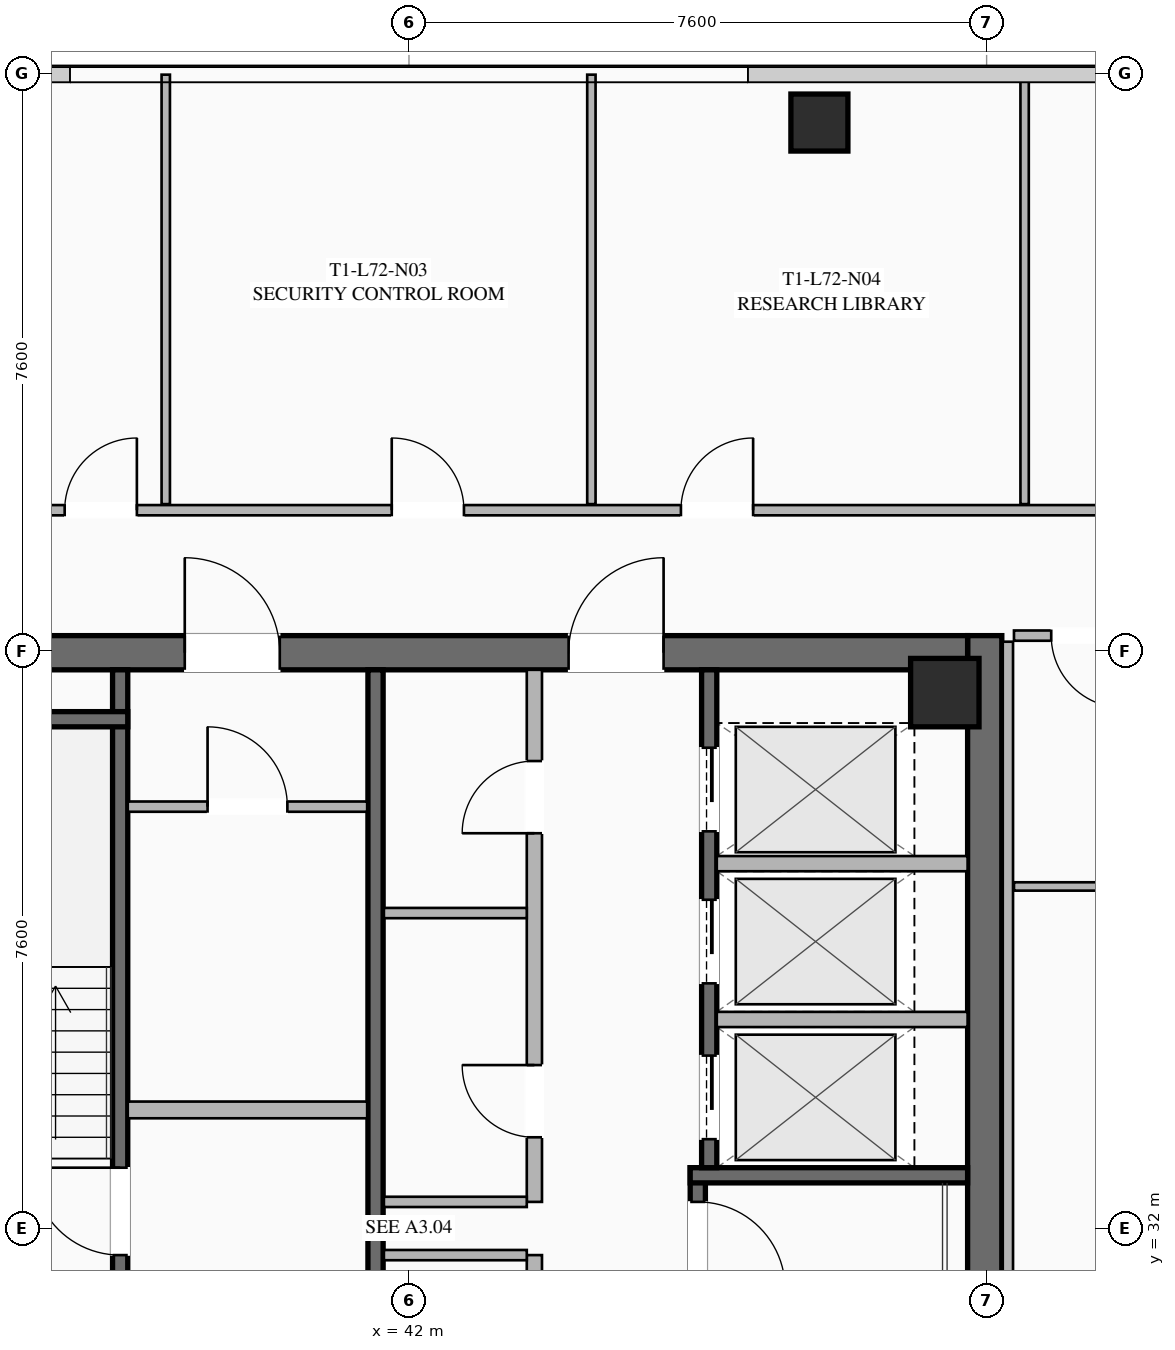
"""IFC4 building model, lengths in metres.
Left out: names, types, materials, properties, quantities, classifications, styles, units other than length and angle.
Written with IfcOpenShell. Run it as: python <this file> out.ifc"""

import sys

from ifc_helpers import new_model, si_unit, direction, frame, frame_2d, origin, origin_2d, place, context, subcontext, project, spatial, rectangle, hollow_rectangle, extrude, element, fill, save


model = new_model("IFC4")
c1 = context("Model", 3, precision=1e-05, world=origin(), true_north=direction((0.0, 1.0)))
c2 = subcontext(c1, "Body", "Model", "MODEL_VIEW")
j1 = project(units=[si_unit("LENGTHUNIT", "METRE"), si_unit("PLANEANGLEUNIT", "RADIAN")], contexts=[c1])
p1 = place(None, origin())
s1 = spatial("IfcSite", under=j1, at=p1, CompositionType="ELEMENT")
p2 = place(p1, origin())
s2 = spatial("IfcBuilding", under=s1, at=p2, CompositionType="ELEMENT")
p3 = place(p2, frame((0.0, 0.0, 266.95)))
s3 = spatial("IfcBuildingStorey", under=s2, at=p3, CompositionType="ELEMENT", Elevation=266.95)
p4 = place(p3, frame((49.575, 39.8, 0.0), z_axis=(0.0, 0.0, 1.0), x_axis=(0.0, -1.0, 0.0)))
e1 = element("IfcWall", 1, at=p4, inside=s3, PredefinedType="SHEAR", context=c2, shape_type="SweptSolid", body=[
    extrude(rectangle(XDim=15.6, YDim=0.45, at=frame_2d((7.8, 0.0))), origin(), (0.0, 0.0, 1.0), 3.55),
])
p5 = place(p3, frame((34.65, 39.575, 0.0), z_axis=(0.0, 0.0, 1.0), x_axis=(1.0, 0.0, 0.0)))
e2 = element("IfcWall", 2, at=p5, inside=s3, PredefinedType="SHEAR", context=c2, shape_type="SweptSolid", body=[
    extrude(rectangle(XDim=14.7, YDim=0.45, at=frame_2d((7.35, 0.0))), origin(), (0.0, 0.0, 1.0), 3.55),
])
p6 = place(p5, frame((4.4, 0.0, 0.0)))
e3 = element("IfcOpeningElement", 3, at=p6, cuts=e2, PredefinedType="OPENING", context=c2, shape_type="SweptSolid", body=[
    extrude(rectangle(XDim=1.25, YDim=2.25, at=frame_2d((0.625, 1.125))), frame((0.0, 0.235, 0.0), z_axis=(0.0, -1.0, 0.0), x_axis=(1.0, 0.0, 0.0)), (0.0, 0.0, 1.0), 0.47),
])
p7 = place(p5, frame((9.45, 0.0, 0.0)))
e4 = element("IfcOpeningElement", 4, at=p7, cuts=e2, PredefinedType="OPENING", context=c2, shape_type="SweptSolid", body=[
    extrude(rectangle(XDim=1.25, YDim=2.25, at=frame_2d((0.625, 1.125))), frame((0.0, 0.235, 0.0), z_axis=(0.0, -1.0, 0.0), x_axis=(1.0, 0.0, 0.0)), (0.0, 0.0, 1.0), 0.47),
])
p8 = place(p3, frame((49.05, 39.05, 0.0), z_axis=(0.0, 0.0, 1.0), x_axis=(1.0, 0.0, 0.0)))
e5 = element("IfcColumn", 5, at=p8, inside=s3, PredefinedType="COLUMN", context=c2, shape_type="SweptSolid", body=[
    extrude(hollow_rectangle(XDim=0.9, YDim=0.9, WallThickness=0.04, at=origin_2d()), origin(), (0.0, 0.0, 1.0), 3.37),
])
p9 = place(p3, frame((47.4, 46.55, 0.0), z_axis=(0.0, 0.0, 1.0), x_axis=(1.0, 0.0, 0.0)))
e6 = element("IfcColumn", 6, at=p9, inside=s3, PredefinedType="COLUMN", context=c2, shape_type="SweptSolid", body=[
    extrude(hollow_rectangle(XDim=0.75, YDim=0.75, WallThickness=0.032, at=origin_2d()), origin(), (0.0, 0.0, 1.0), 3.37),
])
p10 = place(p3, frame((38.2, 31.2, 0.0), z_axis=(0.0, 0.0, 1.0), x_axis=(0.0, 1.0, 0.0)))
e7 = element("IfcWall", 7, at=p10, inside=s3, PredefinedType="SHEAR", context=c2, shape_type="SweptSolid", body=[
    extrude(rectangle(XDim=8.15, YDim=0.2, at=frame_2d((4.075, 0.0))), origin(), (0.0, 0.0, 1.0), 3.37),
])
p11 = place(p10, frame((0.45, 0.0, 0.0)))
e8 = element("IfcOpeningElement", 8, at=p11, cuts=e7, PredefinedType="OPENING", context=c2, shape_type="SweptSolid", body=[
    extrude(rectangle(XDim=1.15, YDim=2.2, at=frame_2d((0.575, 1.1))), frame((0.0, 0.11, 0.0), z_axis=(0.0, -1.0, 0.0), x_axis=(1.0, 0.0, 0.0)), (0.0, 0.0, 1.0), 0.22),
])
p12 = place(p3, frame((34.65, 38.7, 0.0), z_axis=(0.0, 0.0, 1.0), x_axis=(1.0, 0.0, 0.0)))
e9 = element("IfcWall", 9, at=p12, inside=s3, PredefinedType="SHEAR", context=c2, shape_type="SweptSolid", body=[
    extrude(rectangle(XDim=3.65, YDim=0.2, at=frame_2d((1.825, 0.0))), origin(), (0.0, 0.0, 1.0), 3.37),
])
p13 = place(p3, frame((45.8, 32.8, 0.0), z_axis=(0.0, 0.0, 1.0), x_axis=(0.0, -1.0, 0.0)))
e10 = element("IfcWall", 10, at=p13, inside=s3, PredefinedType="SHEAR", context=c2, shape_type="SweptSolid", body=[
    extrude(rectangle(XDim=8.15, YDim=0.2, at=frame_2d((4.075, 0.0))), origin(), (0.0, 0.0, 1.0), 3.37),
])
p14 = place(p13, frame((0.45, 0.0, 0.0)))
e11 = element("IfcOpeningElement", 11, at=p14, cuts=e10, PredefinedType="OPENING", context=c2, shape_type="SweptSolid", body=[
    extrude(rectangle(XDim=1.15, YDim=2.2, at=frame_2d((0.575, 1.1))), frame((0.0, 0.11, 0.0), z_axis=(0.0, -1.0, 0.0), x_axis=(1.0, 0.0, 0.0)), (0.0, 0.0, 1.0), 0.22),
])
p15 = place(p3, frame((45.7, 32.7, 0.0), z_axis=(0.0, 0.0, 1.0), x_axis=(1.0, 0.0, 0.0)))
e12 = element("IfcWall", 12, at=p15, inside=s3, PredefinedType="SHEAR", context=c2, shape_type="SweptSolid", body=[
    extrude(rectangle(XDim=3.65, YDim=0.2, at=frame_2d((1.825, 0.0))), origin(), (0.0, 0.0, 1.0), 3.37),
])
p16 = place(p3, frame((41.56, 24.65, 0.0), z_axis=(0.0, 0.0, 1.0), x_axis=(0.0, 1.0, 0.0)))
e13 = element("IfcWall", 13, at=p16, inside=s3, PredefinedType="SHEAR", context=c2, shape_type="SweptSolid", body=[
    extrude(rectangle(XDim=14.7, YDim=0.2, at=frame_2d((7.35, 0.0))), origin(), (0.0, 0.0, 1.0), 3.37),
])
p17 = place(p3, frame((38.3, 33.56, 0.0), z_axis=(0.0, 0.0, 1.0), x_axis=(1.0, 0.0, 0.0)))
e14 = element("IfcWall", 14, at=p17, inside=s3, PredefinedType="SOLIDWALL", context=c2, shape_type="SweptSolid", body=[
    extrude(rectangle(XDim=3.15, YDim=0.22, at=frame_2d((1.575, 0.0))), origin(), (0.0, 0.0, 1.0), 2.723),
])
p18 = place(p3, frame((45.95, 39.35, 0.0), z_axis=(0.0, 0.0, 1.0), x_axis=(0.0, -1.0, 0.0)))
e15 = element("IfcWall", 15, at=p18, inside=s3, PredefinedType="SHEAR", context=c2, shape_type="SweptSolid", body=[
    extrude(rectangle(XDim=6.55, YDim=0.2, at=frame_2d((3.275, 0.0))), origin(), (0.0, 0.0, 1.0), 3.37),
])
p19 = place(p18, frame((5.075, 0.0, 0.0)))
e16 = element("IfcOpeningElement", 16, at=p19, cuts=e15, PredefinedType="OPENING", context=c2, shape_type="SweptSolid", body=[
    extrude(rectangle(XDim=1.1, YDim=2.2, at=frame_2d((0.55, 1.1))), frame((0.0, 0.11, 0.0), z_axis=(0.0, -1.0, 0.0), x_axis=(1.0, 0.0, 0.0)), (0.0, 0.0, 1.0), 0.22),
])
p20 = place(p18, frame((3.025, 0.0, 0.0)))
e17 = element("IfcOpeningElement", 17, at=p20, cuts=e15, PredefinedType="OPENING", context=c2, shape_type="SweptSolid", body=[
    extrude(rectangle(XDim=1.1, YDim=2.2, at=frame_2d((0.55, 1.1))), frame((0.0, 0.11, 0.0), z_axis=(0.0, -1.0, 0.0), x_axis=(1.0, 0.0, 0.0)), (0.0, 0.0, 1.0), 0.22),
])
p21 = place(p18, frame((1.025, 0.0, 0.0)))
e18 = element("IfcOpeningElement", 18, at=p21, cuts=e15, PredefinedType="OPENING", context=c2, shape_type="SweptSolid", body=[
    extrude(rectangle(XDim=1.1, YDim=2.2, at=frame_2d((0.55, 1.1))), frame((0.0, 0.11, 0.0), z_axis=(0.0, -1.0, 0.0), x_axis=(1.0, 0.0, 0.0)), (0.0, 0.0, 1.0), 0.22),
])
for number, where, z_axis, x_axis in (
    (19, (46.05, 34.75, 0.0), (0.0, 0.0, 1.0), (1.0, 0.0, 0.0)),
    (20, (46.05, 36.8, 0.0), (0.0, 0.0, 1.0), (1.0, 0.0, 0.0)),
):
    element("IfcWall", number, at=place(p3, frame(where, z_axis=z_axis, x_axis=x_axis)), inside=s3, PredefinedType="SOLIDWALL", context=c2, shape_type="SweptSolid", body=[
        extrude(rectangle(XDim=3.3, YDim=0.2, at=frame_2d((1.65, 0.0))), origin(), (0.0, 0.0, 1.0), 3.37),
    ])
p22 = place(p3, frame((38.3, 37.55, 0.0), z_axis=(0.0, 0.0, 1.0), x_axis=(1.0, 0.0, 0.0)))
e21 = element("IfcWall", 21, at=p22, inside=s3, PredefinedType="PARTITIONING", context=c2, shape_type="SweptSolid", body=[
    extrude(rectangle(XDim=3.15, YDim=0.135, at=frame_2d((1.575, 0.0))), origin(), (0.0, 0.0, 1.0), 2.723),
])
p23 = place(p22, frame((1.05, 0.0, 0.0)))
e22 = element("IfcOpeningElement", 22, at=p23, cuts=e21, PredefinedType="OPENING", context=c2, shape_type="SweptSolid", body=[
    extrude(rectangle(XDim=1.05, YDim=2.2, at=frame_2d((0.525, 1.1))), frame((0.0, 0.077, 0.0), z_axis=(0.0, -1.0, 0.0), x_axis=(1.0, 0.0, 0.0)), (0.0, 0.0, 1.0), 0.155),
])
p24 = place(p3, frame((43.65, 24.65, 0.0), z_axis=(0.0, 0.0, 1.0), x_axis=(0.0, 1.0, 0.0)))
e23 = element("IfcWall", 23, at=p24, inside=s3, PredefinedType="SOLIDWALL", context=c2, shape_type="SweptSolid", body=[
    extrude(rectangle(XDim=7.0, YDim=0.2, at=frame_2d((3.5, 0.0))), origin(), (0.0, 0.0, 1.0), 2.723),
])
p25 = place(p24, frame((0.85, 0.0, 0.0)))
e24 = element("IfcOpeningElement", 24, at=p25, cuts=e23, PredefinedType="OPENING", context=c2, shape_type="SweptSolid", body=[
    extrude(rectangle(XDim=0.95, YDim=2.05, at=frame_2d((0.475, 1.025))), frame((0.0, 0.11, 0.0), z_axis=(0.0, -1.0, 0.0), x_axis=(1.0, 0.0, 0.0)), (0.0, 0.0, 1.0), 0.22),
])
p26 = place(p24, frame((4.8, 0.0, 0.0)))
e25 = element("IfcOpeningElement", 25, at=p26, cuts=e23, PredefinedType="OPENING", context=c2, shape_type="SweptSolid", body=[
    extrude(rectangle(XDim=1.05, YDim=2.2, at=frame_2d((0.525, 1.1))), frame((0.0, 0.11, 0.0), z_axis=(0.0, -1.0, 0.0), x_axis=(1.0, 0.0, 0.0)), (0.0, 0.0, 1.0), 0.22),
])
p27 = place(p3, frame((41.67, 31.65, 0.0), z_axis=(0.0, 0.0, 1.0), x_axis=(1.0, 0.0, 0.0)))
e26 = element("IfcWall", 26, at=p27, inside=s3, PredefinedType="PARTITIONING", context=c2, shape_type="SweptSolid", body=[
    extrude(rectangle(XDim=1.88, YDim=0.135, at=frame_2d((0.94, 0.0))), origin(), (0.0, 0.0, 1.0), 2.723),
])
p28 = place(p3, frame((43.65, 32.35, 0.0), z_axis=(0.0, 0.0, 1.0), x_axis=(0.0, 1.0, 0.0)))
e27 = element("IfcWall", 27, at=p28, inside=s3, PredefinedType="SOLIDWALL", context=c2, shape_type="SweptSolid", body=[
    extrude(rectangle(XDim=7.0, YDim=0.2, at=frame_2d((3.5, 0.0))), origin(), (0.0, 0.0, 1.0), 2.723),
])
p29 = place(p28, frame((0.85, 0.0, 0.0)))
e28 = element("IfcOpeningElement", 28, at=p29, cuts=e27, PredefinedType="OPENING", context=c2, shape_type="SweptSolid", body=[
    extrude(rectangle(XDim=0.95, YDim=2.05, at=frame_2d((0.475, 1.025))), frame((0.0, 0.11, 0.0), z_axis=(0.0, -1.0, 0.0), x_axis=(1.0, 0.0, 0.0)), (0.0, 0.0, 1.0), 0.22),
])
p30 = place(p28, frame((4.85, 0.0, 0.0)))
e29 = element("IfcOpeningElement", 29, at=p30, cuts=e27, PredefinedType="OPENING", context=c2, shape_type="SweptSolid", body=[
    extrude(rectangle(XDim=0.95, YDim=2.05, at=frame_2d((0.475, 1.025))), frame((0.0, 0.11, 0.0), z_axis=(0.0, -1.0, 0.0), x_axis=(1.0, 0.0, 0.0)), (0.0, 0.0, 1.0), 0.22),
])
for number, where, z_axis, x_axis in (
    (30, (41.67, 32.35, 0.0), (0.0, 0.0, 1.0), (1.0, 0.0, 0.0)),
    (31, (41.67, 36.15, 0.0), (0.0, 0.0, 1.0), (1.0, 0.0, 0.0)),
):
    element("IfcWall", number, at=place(p3, frame(where, z_axis=z_axis, x_axis=x_axis)), inside=s3, PredefinedType="PARTITIONING", context=c2, shape_type="SweptSolid", body=[
        extrude(rectangle(XDim=1.88, YDim=0.135, at=frame_2d((0.94, 0.0))), origin(), (0.0, 0.0, 1.0), 2.723),
    ])
p31 = place(p3, frame((28.85, 41.45, 0.0), z_axis=(0.0, 0.0, 1.0), x_axis=(1.0, 0.0, 0.0)))
e32 = element("IfcWall", 32, at=p31, inside=s3, PredefinedType="PARTITIONING", context=c2, shape_type="SweptSolid", body=[
    extrude(rectangle(XDim=26.3, YDim=0.135, at=frame_2d((13.15, 0.0))), origin(), (0.0, 0.0, 1.0), 2.723),
])
p32 = place(p31, frame((0.3, 0.0, 0.0)))
e33 = element("IfcOpeningElement", 33, at=p32, cuts=e32, PredefinedType="OPENING", context=c2, shape_type="SweptSolid", body=[
    extrude(rectangle(XDim=0.95, YDim=2.05, at=frame_2d((0.475, 1.025))), frame((0.0, 0.077, 0.0), z_axis=(0.0, -1.0, 0.0), x_axis=(1.0, 0.0, 0.0)), (0.0, 0.0, 1.0), 0.155),
])
p33 = place(p31, frame((8.62, 0.0, 0.0)))
e34 = element("IfcOpeningElement", 34, at=p33, cuts=e32, PredefinedType="OPENING", context=c2, shape_type="SweptSolid", body=[
    extrude(rectangle(XDim=0.95, YDim=2.05, at=frame_2d((0.475, 1.025))), frame((0.0, 0.077, 0.0), z_axis=(0.0, -1.0, 0.0), x_axis=(1.0, 0.0, 0.0)), (0.0, 0.0, 1.0), 0.155),
])
p34 = place(p31, frame((12.923, 0.0, 0.0)))
e35 = element("IfcOpeningElement", 35, at=p34, cuts=e32, PredefinedType="OPENING", context=c2, shape_type="SweptSolid", body=[
    extrude(rectangle(XDim=0.95, YDim=2.05, at=frame_2d((0.475, 1.025))), frame((0.0, 0.077, 0.0), z_axis=(0.0, -1.0, 0.0), x_axis=(1.0, 0.0, 0.0)), (0.0, 0.0, 1.0), 0.155),
])
p35 = place(p31, frame((16.728, 0.0, 0.0)))
e36 = element("IfcOpeningElement", 36, at=p35, cuts=e32, PredefinedType="OPENING", context=c2, shape_type="SweptSolid", body=[
    extrude(rectangle(XDim=0.95, YDim=2.05, at=frame_2d((0.475, 1.025))), frame((0.0, 0.077, 0.0), z_axis=(0.0, -1.0, 0.0), x_axis=(1.0, 0.0, 0.0)), (0.0, 0.0, 1.0), 0.155),
])
p36 = place(p31, frame((25.05, 0.0, 0.0)))
e37 = element("IfcOpeningElement", 37, at=p36, cuts=e32, PredefinedType="OPENING", context=c2, shape_type="SweptSolid", body=[
    extrude(rectangle(XDim=0.95, YDim=2.05, at=frame_2d((0.475, 1.025))), frame((0.0, 0.077, 0.0), z_axis=(0.0, -1.0, 0.0), x_axis=(1.0, 0.0, 0.0)), (0.0, 0.0, 1.0), 0.155),
])
for number, where, z_axis, x_axis in (
    (38, (38.8, 41.53, 0.0), (0.0, 0.0, 1.0), (0.0, 1.0, 0.0)),
    (39, (44.4, 41.53, 0.0), (0.0, 0.0, 1.0), (0.0, 1.0, 0.0)),
    (40, (50.1, 41.53, 0.0), (0.0, 0.0, 1.0), (0.0, 1.0, 0.0)),
):
    element("IfcWall", number, at=place(p3, frame(where, z_axis=z_axis, x_axis=x_axis)), inside=s3, PredefinedType="PARTITIONING", context=c2, shape_type="SweptSolid", body=[
        extrude(rectangle(XDim=5.65, YDim=0.11, at=frame_2d((2.825, 0.0))), origin(), (0.0, 0.0, 1.0), 2.723),
    ])
p37 = place(p3, frame((49.88, 39.72, 0.0), z_axis=(0.0, 0.0, 1.0), x_axis=(0.0, -1.0, 0.0)))
e41 = element("IfcWall", 41, at=p37, inside=s3, PredefinedType="PARTITIONING", context=c2, shape_type="SweptSolid", body=[
    extrude(rectangle(XDim=15.44, YDim=0.135, at=frame_2d((7.72, 0.0))), origin(), (0.0, 0.0, 1.0), 2.723),
])
p38 = place(p3, frame((57.18, 39.8, 0.0), z_axis=(0.0, 0.0, 1.0), x_axis=(-1.0, 0.0, 0.0)))
e42 = element("IfcWall", 42, at=p38, inside=s3, PredefinedType="PARTITIONING", context=c2, shape_type="SweptSolid", body=[
    extrude(rectangle(XDim=7.22, YDim=0.135, at=frame_2d((3.61, 0.0))), origin(), (0.0, 0.0, 1.0), 2.723),
])
p39 = place(p38, frame((5.78, 0.0, 0.0)))
e43 = element("IfcOpeningElement", 43, at=p39, cuts=e42, PredefinedType="OPENING", context=c2, shape_type="SweptSolid", body=[
    extrude(rectangle(XDim=0.95, YDim=2.05, at=frame_2d((0.475, 1.025))), frame((0.0, 0.077, 0.0), z_axis=(0.0, -1.0, 0.0), x_axis=(1.0, 0.0, 0.0)), (0.0, 0.0, 1.0), 0.155),
])
p40 = place(p3, frame((49.96, 36.5, 0.0), z_axis=(0.0, 0.0, 1.0), x_axis=(1.0, 0.0, 0.0)))
e44 = element("IfcWall", 44, at=p40, inside=s3, PredefinedType="PARTITIONING", context=c2, shape_type="SweptSolid", body=[
    extrude(rectangle(XDim=7.22, YDim=0.11, at=frame_2d((3.61, 0.0))), origin(), (0.0, 0.0, 1.0), 2.723),
])
p41 = place(p40, frame((1.8, 0.0, 0.0)))
e45 = element("IfcOpeningElement", 45, at=p41, cuts=e44, PredefinedType="OPENING", context=c2, shape_type="SweptSolid", body=[
    extrude(rectangle(XDim=0.95, YDim=2.05, at=frame_2d((0.475, 1.025))), frame((0.0, 0.065, 0.0), z_axis=(0.0, -1.0, 0.0), x_axis=(1.0, 0.0, 0.0)), (0.0, 0.0, 1.0), 0.13),
])
p42 = place(p6, origin())
e46 = element("IfcDoor", 46, at=p42, inside=s3, OperationType="SINGLE_SWING_LEFT", PredefinedType="DOOR", context=c2, shape_type="SweptSolid", body=[
    extrude(rectangle(XDim=1.25, YDim=2.25, at=frame_2d((0.625, 1.125))), frame((0.0, 0.025, 0.0), z_axis=(0.0, -1.0, 0.0), x_axis=(1.0, 0.0, 0.0)), (0.0, 0.0, 1.0), 0.05),
])
fill(e3, e46)
p43 = place(p7, origin())
e47 = element("IfcDoor", 47, at=p43, inside=s3, OperationType="SINGLE_SWING_RIGHT", PredefinedType="DOOR", context=c2, shape_type="SweptSolid", body=[
    extrude(rectangle(XDim=1.25, YDim=2.25, at=frame_2d((0.625, 1.125))), frame((0.0, 0.025, 0.0), z_axis=(0.0, -1.0, 0.0), x_axis=(1.0, 0.0, 0.0)), (0.0, 0.0, 1.0), 0.05),
])
fill(e4, e47)
p44 = place(p11, origin())
e48 = element("IfcDoor", 48, at=p44, inside=s3, OperationType="SINGLE_SWING_RIGHT", PredefinedType="DOOR", context=c2, shape_type="SweptSolid", body=[
    extrude(rectangle(XDim=1.15, YDim=2.2, at=frame_2d((0.575, 1.1))), frame((0.0, 0.025, 0.0), z_axis=(0.0, -1.0, 0.0), x_axis=(1.0, 0.0, 0.0)), (0.0, 0.0, 1.0), 0.05),
])
fill(e8, e48)
p45 = place(p14, origin())
e49 = element("IfcDoor", 49, at=p45, inside=s3, OperationType="SINGLE_SWING_RIGHT", PredefinedType="DOOR", context=c2, shape_type="SweptSolid", body=[
    extrude(rectangle(XDim=1.15, YDim=2.2, at=frame_2d((0.575, 1.1))), frame((0.0, 0.025, 0.0), z_axis=(0.0, -1.0, 0.0), x_axis=(1.0, 0.0, 0.0)), (0.0, 0.0, 1.0), 0.05),
])
fill(e11, e49)
p46 = place(p23, origin())
e50 = element("IfcDoor", 50, at=p46, inside=s3, OperationType="SINGLE_SWING_LEFT", PredefinedType="DOOR", context=c2, shape_type="SweptSolid", body=[
    extrude(rectangle(XDim=1.05, YDim=2.2, at=frame_2d((0.525, 1.1))), frame((0.0, 0.025, 0.0), z_axis=(0.0, -1.0, 0.0), x_axis=(1.0, 0.0, 0.0)), (0.0, 0.0, 1.0), 0.05),
])
fill(e22, e50)
p47 = place(p29, origin())
e51 = element("IfcDoor", 51, at=p47, inside=s3, OperationType="SINGLE_SWING_RIGHT", PredefinedType="DOOR", context=c2, shape_type="SweptSolid", body=[
    extrude(rectangle(XDim=0.95, YDim=2.05, at=frame_2d((0.475, 1.025))), frame((0.0, 0.025, 0.0), z_axis=(0.0, -1.0, 0.0), x_axis=(1.0, 0.0, 0.0)), (0.0, 0.0, 1.0), 0.05),
])
fill(e28, e51)
p48 = place(p30, origin())
e52 = element("IfcDoor", 52, at=p48, inside=s3, OperationType="SINGLE_SWING_LEFT", PredefinedType="DOOR", context=c2, shape_type="SweptSolid", body=[
    extrude(rectangle(XDim=0.95, YDim=2.05, at=frame_2d((0.475, 1.025))), frame((0.0, 0.025, 0.0), z_axis=(0.0, -1.0, 0.0), x_axis=(1.0, 0.0, 0.0)), (0.0, 0.0, 1.0), 0.05),
])
fill(e29, e52)
p49 = place(p33, origin())
e53 = element("IfcDoor", 53, at=p49, inside=s3, OperationType="SINGLE_SWING_RIGHT", PredefinedType="DOOR", context=c2, shape_type="SweptSolid", body=[
    extrude(rectangle(XDim=0.95, YDim=2.05, at=frame_2d((0.475, 1.025))), frame((0.0, 0.025, 0.0), z_axis=(0.0, -1.0, 0.0), x_axis=(1.0, 0.0, 0.0)), (0.0, 0.0, 1.0), 0.05),
])
fill(e34, e53)
p50 = place(p34, origin())
e54 = element("IfcDoor", 54, at=p50, inside=s3, OperationType="SINGLE_SWING_LEFT", PredefinedType="DOOR", context=c2, shape_type="SweptSolid", body=[
    extrude(rectangle(XDim=0.95, YDim=2.05, at=frame_2d((0.475, 1.025))), frame((0.0, 0.025, 0.0), z_axis=(0.0, -1.0, 0.0), x_axis=(1.0, 0.0, 0.0)), (0.0, 0.0, 1.0), 0.05),
])
fill(e35, e54)
p51 = place(p35, origin())
e55 = element("IfcDoor", 55, at=p51, inside=s3, OperationType="SINGLE_SWING_RIGHT", PredefinedType="DOOR", context=c2, shape_type="SweptSolid", body=[
    extrude(rectangle(XDim=0.95, YDim=2.05, at=frame_2d((0.475, 1.025))), frame((0.0, 0.025, 0.0), z_axis=(0.0, -1.0, 0.0), x_axis=(1.0, 0.0, 0.0)), (0.0, 0.0, 1.0), 0.05),
])
fill(e36, e55)
p52 = place(p39, origin())
e56 = element("IfcDoor", 56, at=p52, inside=s3, OperationType="SINGLE_SWING_LEFT", PredefinedType="DOOR", context=c2, shape_type="SweptSolid", body=[
    extrude(rectangle(XDim=0.95, YDim=2.05, at=frame_2d((0.475, 1.025))), frame((0.0, 0.025, 0.0), z_axis=(0.0, -1.0, 0.0), x_axis=(1.0, 0.0, 0.0)), (0.0, 0.0, 1.0), 0.05),
])
fill(e43, e56)
p53 = place(p19, origin())
e57 = element("IfcDoor", 57, at=p53, inside=s3, OperationType="SLIDING_TO_LEFT", PredefinedType="DOOR", context=c2, shape_type="SweptSolid", body=[
    extrude(rectangle(XDim=1.1, YDim=2.2, at=frame_2d((0.55, 1.1))), frame((0.0, 0.025, 0.0), z_axis=(0.0, -1.0, 0.0), x_axis=(1.0, 0.0, 0.0)), (0.0, 0.0, 1.0), 0.05),
])
fill(e16, e57)
p54 = place(p20, origin())
e58 = element("IfcDoor", 58, at=p54, inside=s3, OperationType="SLIDING_TO_LEFT", PredefinedType="DOOR", context=c2, shape_type="SweptSolid", body=[
    extrude(rectangle(XDim=1.1, YDim=2.2, at=frame_2d((0.55, 1.1))), frame((0.0, 0.025, 0.0), z_axis=(0.0, -1.0, 0.0), x_axis=(1.0, 0.0, 0.0)), (0.0, 0.0, 1.0), 0.05),
])
fill(e17, e58)
p55 = place(p21, origin())
e59 = element("IfcDoor", 59, at=p55, inside=s3, OperationType="SLIDING_TO_LEFT", PredefinedType="DOOR", context=c2, shape_type="SweptSolid", body=[
    extrude(rectangle(XDim=1.1, YDim=2.2, at=frame_2d((0.55, 1.1))), frame((0.0, 0.025, 0.0), z_axis=(0.0, -1.0, 0.0), x_axis=(1.0, 0.0, 0.0)), (0.0, 0.0, 1.0), 0.05),
])
fill(e18, e59)
save(model, sys.argv[1])
